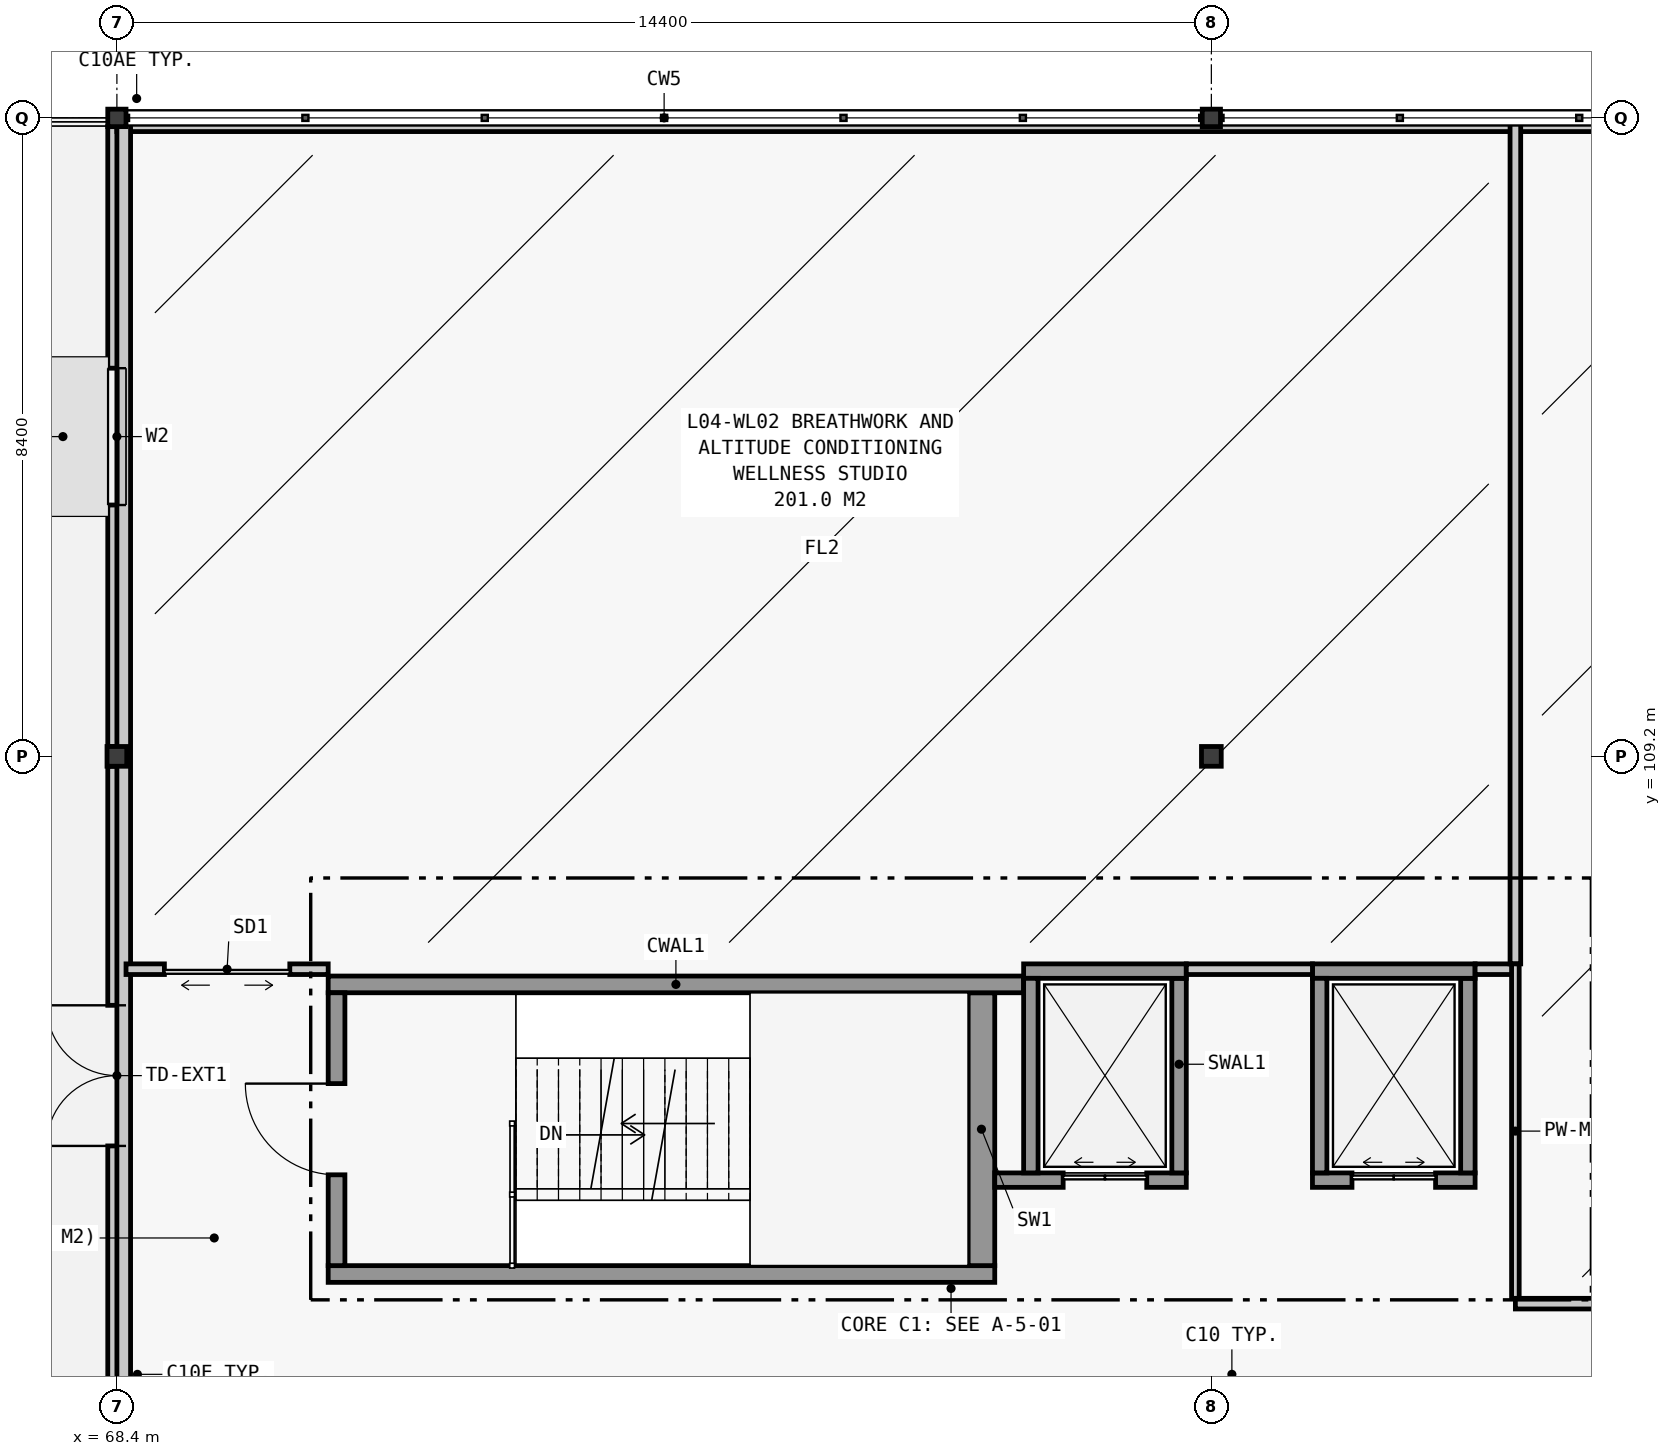
"""IFC4 building model, lengths in metres.
Left out: names, types, materials, properties, quantities, classifications, styles, units other than length and angle.
Written with IfcOpenShell. Run it as: python <this file> out.ifc"""

import sys

from ifc_helpers import new_model, si_unit, direction, frame, frame_2d, origin, origin_2d, place, context, subcontext, project, spatial, rectangle, i_section, extrude, element, fill, save


model = new_model("IFC4")
c1 = context("Model", 3, precision=1e-05, world=origin(), true_north=direction((0.0, 1.0)))
c2 = subcontext(c1, "Body", "Model", "MODEL_VIEW")
j1 = project(units=[si_unit("LENGTHUNIT", "METRE"), si_unit("PLANEANGLEUNIT", "RADIAN")], contexts=[c1])
p1 = place(None, origin())
s1 = spatial("IfcSite", under=j1, at=p1, CompositionType="ELEMENT")
p2 = place(p1, origin())
s2 = spatial("IfcBuilding", under=s1, at=p2, CompositionType="ELEMENT")
p3 = place(p2, frame((0.0, 0.0, 17.4)))
s3 = spatial("IfcBuildingStorey", under=s2, at=p3, CompositionType="ELEMENT", Elevation=17.4)
p4 = place(p3, frame((68.4, 109.2, 0.0), z_axis=(0.0, 0.0, 1.0), x_axis=(1.0, 0.0, 0.0)))
e1 = element("IfcColumn", 1, at=p4, inside=s3, PredefinedType="COLUMN", context=c2, shape_type="SweptSolid", body=[
    extrude(i_section(OverallWidth=0.26, OverallDepth=0.26, WebThickness=0.01, FlangeThickness=0.018, FilletRadius=0.024, at=origin_2d()), origin(), (0.0, 0.0, 1.0), 4.15),
])
p5 = place(p3, frame((68.4, 117.6, 0.0), z_axis=(0.0, 0.0, 1.0), x_axis=(1.0, 0.0, 0.0)))
e2 = element("IfcColumn", 2, at=p5, inside=s3, PredefinedType="COLUMN", context=c2, shape_type="SweptSolid", body=[
    extrude(i_section(OverallWidth=0.24, OverallDepth=0.23, WebThickness=0.008, FlangeThickness=0.012, FilletRadius=0.021, at=origin_2d()), origin(), (0.0, 0.0, 1.0), 4.15),
])
p6 = place(p3, frame((82.8, 109.2, 0.0), z_axis=(0.0, 0.0, 1.0), x_axis=(1.0, 0.0, 0.0)))
e3 = element("IfcColumn", 3, at=p6, inside=s3, PredefinedType="COLUMN", context=c2, shape_type="SweptSolid", body=[
    extrude(i_section(OverallWidth=0.26, OverallDepth=0.26, WebThickness=0.01, FlangeThickness=0.018, FilletRadius=0.024, at=origin_2d()), origin(), (0.0, 0.0, 1.0), 4.15),
])
p7 = place(p3, frame((82.8, 117.6, 0.0), z_axis=(0.0, 0.0, 1.0), x_axis=(1.0, 0.0, 0.0)))
e4 = element("IfcColumn", 4, at=p7, inside=s3, PredefinedType="COLUMN", context=c2, shape_type="SweptSolid", body=[
    extrude(i_section(OverallWidth=0.24, OverallDepth=0.23, WebThickness=0.008, FlangeThickness=0.012, FilletRadius=0.021, at=origin_2d()), origin(), (0.0, 0.0, 1.0), 4.15),
])
p8 = place(p3, frame((68.4, 109.07, 0.0), z_axis=(0.0, 0.0, 1.0), x_axis=(0.0, -1.0, 0.0)))
e5 = element("IfcWall", 5, at=p8, inside=s3, PredefinedType="STANDARD", context=c2, shape_type="SweptSolid", body=[
    extrude(rectangle(XDim=8.14, YDim=0.24, at=frame_2d((4.07, 0.0))), origin(), (0.0, 0.0, 1.0), 3.437),
])
p9 = place(p8, frame((3.145, 0.0, 0.0)))
e6 = element("IfcOpeningElement", 6, at=p9, cuts=e5, PredefinedType="OPENING", context=c2, shape_type="SweptSolid", body=[
    extrude(rectangle(XDim=1.85, YDim=2.25, at=frame_2d((0.925, 1.125))), frame((0.0, 0.135, 0.0), z_axis=(0.0, -1.0, 0.0), x_axis=(1.0, 0.0, 0.0)), (0.0, 0.0, 1.0), 0.27),
])
p10 = place(p3, frame((68.4, 117.485, 0.0), z_axis=(0.0, 0.0, 1.0), x_axis=(0.0, -1.0, 0.0)))
e7 = element("IfcWall", 7, at=p10, inside=s3, PredefinedType="STANDARD", context=c2, shape_type="SweptSolid", body=[
    extrude(rectangle(XDim=8.155, YDim=0.24, at=frame_2d((4.078, 0.0))), origin(), (0.0, 0.0, 1.0), 3.437),
])
p11 = place(p10, frame((3.178, 0.0, 0.9)))
e8 = element("IfcOpeningElement", 8, at=p11, cuts=e7, PredefinedType="OPENING", context=c2, shape_type="SweptSolid", body=[
    extrude(rectangle(XDim=1.8, YDim=1.8, at=frame_2d((0.9, 0.9))), frame((0.0, 0.135, 0.0), z_axis=(0.0, -1.0, 0.0), x_axis=(1.0, 0.0, 0.0)), (0.0, 0.0, 1.0), 0.27),
])
p12 = place(p3, frame((68.4, 117.51, 4.2), z_axis=(0.0, 0.0, 1.0), x_axis=(1.0, 0.0, 0.0)))
e9 = element("IfcWall", 9, at=p12, inside=s3, PredefinedType="PARAPET", context=c2, shape_type="SweptSolid", body=[
    extrude(rectangle(XDim=57.6, YDim=0.18, at=frame_2d((28.8, 0.0))), origin(), (0.0, 0.0, 1.0), 0.95),
])
p13 = place(p3, frame((68.49, 92.4, 4.2), z_axis=(0.0, 0.0, 1.0), x_axis=(0.0, 1.0, 0.0)))
e10 = element("IfcWall", 10, at=p13, inside=s3, PredefinedType="PARAPET", context=c2, shape_type="SweptSolid", body=[
    extrude(rectangle(XDim=25.2, YDim=0.18, at=frame_2d((12.6, 0.0))), origin(), (0.0, 0.0, 1.0), 0.95),
])
p14 = place(p3, frame((71.18, 102.39, 0.0), z_axis=(0.0, 0.0, 1.0), x_axis=(1.0, 0.0, 0.0)))
e11 = element("IfcWall", 11, at=p14, inside=s3, PredefinedType="SOLIDWALL", context=c2, shape_type="SweptSolid", body=[
    extrude(rectangle(XDim=8.77, YDim=0.22, at=frame_2d((4.385, 0.0))), origin(), (0.0, 0.0, 1.0), 3.98),
])
p15 = place(p3, frame((79.775, 102.5, 0.0), z_axis=(0.0, 0.0, 1.0), x_axis=(0.0, 1.0, 0.0)))
e12 = element("IfcWall", 12, at=p15, inside=s3, PredefinedType="SHEAR", context=c2, shape_type="SweptSolid", body=[
    extrude(rectangle(XDim=3.59, YDim=0.35, at=frame_2d((1.795, 0.0))), origin(), (0.0, 0.0, 1.0), 3.98),
])
p16 = place(p3, frame((80.33, 106.2, 0.0), z_axis=(0.0, 0.0, 1.0), x_axis=(-1.0, 0.0, 0.0)))
e13 = element("IfcWall", 13, at=p16, inside=s3, PredefinedType="SOLIDWALL", context=c2, shape_type="SweptSolid", body=[
    extrude(rectangle(XDim=9.15, YDim=0.22, at=frame_2d((4.575, 0.0))), origin(), (0.0, 0.0, 1.0), 3.98),
])
p17 = place(p3, frame((71.29, 106.09, 0.0), z_axis=(0.0, 0.0, 1.0), x_axis=(0.0, -1.0, 0.0)))
e14 = element("IfcWall", 14, at=p17, inside=s3, PredefinedType="SOLIDWALL", context=c2, shape_type="SweptSolid", body=[
    extrude(rectangle(XDim=3.59, YDim=0.22, at=frame_2d((1.795, 0.0))), origin(), (0.0, 0.0, 1.0), 3.98),
])
p18 = place(p17, frame((1.195, 0.0, 0.0)))
e15 = element("IfcOpeningElement", 15, at=p18, cuts=e14, PredefinedType="OPENING", context=c2, shape_type="SweptSolid", body=[
    extrude(rectangle(XDim=1.2, YDim=2.2, at=frame_2d((0.6, 1.1))), frame((0.0, 0.125, 0.0), z_axis=(0.0, -1.0, 0.0), x_axis=(1.0, 0.0, 0.0)), (0.0, 0.0, 1.0), 0.25),
])
p19 = place(p3, frame((79.95, 103.625, 0.0), z_axis=(0.0, 0.0, 1.0), x_axis=(1.0, 0.0, 0.0)))
e16 = element("IfcWall", 16, at=p19, inside=s3, PredefinedType="SOLIDWALL", context=c2, shape_type="SweptSolid", body=[
    extrude(rectangle(XDim=2.52, YDim=0.19, at=frame_2d((1.26, 0.0))), origin(), (0.0, 0.0, 1.0), 3.98),
])
p20 = place(p19, frame((0.9, 0.0, 0.0)))
e17 = element("IfcOpeningElement", 17, at=p20, cuts=e16, PredefinedType="OPENING", context=c2, shape_type="SweptSolid", body=[
    extrude(rectangle(XDim=1.1, YDim=2.2, at=frame_2d((0.55, 1.1))), frame((0.0, 0.11, 0.0), z_axis=(0.0, -1.0, 0.0), x_axis=(1.0, 0.0, 0.0)), (0.0, 0.0, 1.0), 0.22),
])
p21 = place(p3, frame((82.375, 103.72, 0.0), z_axis=(0.0, 0.0, 1.0), x_axis=(0.0, 1.0, 0.0)))
e18 = element("IfcWall", 18, at=p21, inside=s3, PredefinedType="SOLIDWALL", context=c2, shape_type="SweptSolid", body=[
    extrude(rectangle(XDim=2.56, YDim=0.19, at=frame_2d((1.28, 0.0))), origin(), (0.0, 0.0, 1.0), 3.98),
])
p22 = place(p3, frame((82.47, 106.375, 0.0), z_axis=(0.0, 0.0, 1.0), x_axis=(-1.0, 0.0, 0.0)))
e19 = element("IfcWall", 19, at=p22, inside=s3, PredefinedType="SOLIDWALL", context=c2, shape_type="SweptSolid", body=[
    extrude(rectangle(XDim=2.14, YDim=0.19, at=frame_2d((1.07, 0.0))), origin(), (0.0, 0.0, 1.0), 3.98),
])
p23 = place(p3, frame((80.425, 106.28, 0.0), z_axis=(0.0, 0.0, 1.0), x_axis=(0.0, -1.0, 0.0)))
e20 = element("IfcWall", 20, at=p23, inside=s3, PredefinedType="SOLIDWALL", context=c2, shape_type="SweptSolid", body=[
    extrude(rectangle(XDim=2.56, YDim=0.19, at=frame_2d((1.28, 0.0))), origin(), (0.0, 0.0, 1.0), 3.98),
])
p24 = place(p3, frame((84.13, 103.625, 0.0), z_axis=(0.0, 0.0, 1.0), x_axis=(1.0, 0.0, 0.0)))
e21 = element("IfcWall", 21, at=p24, inside=s3, PredefinedType="SOLIDWALL", context=c2, shape_type="SweptSolid", body=[
    extrude(rectangle(XDim=2.14, YDim=0.19, at=frame_2d((1.07, 0.0))), origin(), (0.0, 0.0, 1.0), 3.98),
])
p25 = place(p24, frame((0.52, 0.0, 0.0)))
e22 = element("IfcOpeningElement", 22, at=p25, cuts=e21, PredefinedType="OPENING", context=c2, shape_type="SweptSolid", body=[
    extrude(rectangle(XDim=1.1, YDim=2.2, at=frame_2d((0.55, 1.1))), frame((0.0, 0.11, 0.0), z_axis=(0.0, -1.0, 0.0), x_axis=(1.0, 0.0, 0.0)), (0.0, 0.0, 1.0), 0.22),
])
p26 = place(p3, frame((86.175, 103.72, 0.0), z_axis=(0.0, 0.0, 1.0), x_axis=(0.0, 1.0, 0.0)))
e23 = element("IfcWall", 23, at=p26, inside=s3, PredefinedType="SOLIDWALL", context=c2, shape_type="SweptSolid", body=[
    extrude(rectangle(XDim=2.56, YDim=0.19, at=frame_2d((1.28, 0.0))), origin(), (0.0, 0.0, 1.0), 3.98),
])
p27 = place(p3, frame((86.27, 106.375, 0.0), z_axis=(0.0, 0.0, 1.0), x_axis=(-1.0, 0.0, 0.0)))
e24 = element("IfcWall", 24, at=p27, inside=s3, PredefinedType="SOLIDWALL", context=c2, shape_type="SweptSolid", body=[
    extrude(rectangle(XDim=2.14, YDim=0.19, at=frame_2d((1.07, 0.0))), origin(), (0.0, 0.0, 1.0), 3.98),
])
p28 = place(p3, frame((84.225, 106.28, 0.0), z_axis=(0.0, 0.0, 1.0), x_axis=(0.0, -1.0, 0.0)))
e25 = element("IfcWall", 25, at=p28, inside=s3, PredefinedType="SOLIDWALL", context=c2, shape_type="SweptSolid", body=[
    extrude(rectangle(XDim=2.56, YDim=0.19, at=frame_2d((1.28, 0.0))), origin(), (0.0, 0.0, 1.0), 3.98),
])
p29 = place(p3, frame((68.52, 106.4, 0.0), z_axis=(0.0, 0.0, 1.0), x_axis=(1.0, 0.0, 0.0)))
e26 = element("IfcWall", 26, at=p29, inside=s3, PredefinedType="PARTITIONING", context=c2, shape_type="SweptSolid", body=[
    extrude(rectangle(XDim=2.66, YDim=0.14, at=frame_2d((1.33, 0.0))), origin(), (0.0, 0.0, 1.0), 3.98),
])
p30 = place(p29, frame((0.505, 0.0, 0.0)))
e27 = element("IfcOpeningElement", 27, at=p30, cuts=e26, PredefinedType="OPENING", context=c2, shape_type="SweptSolid", body=[
    extrude(rectangle(XDim=1.65, YDim=2.25, at=frame_2d((0.825, 1.125))), frame((0.0, 0.085, 0.0), z_axis=(0.0, -1.0, 0.0), x_axis=(1.0, 0.0, 0.0)), (0.0, 0.0, 1.0), 0.17),
])
p31 = place(p3, frame((82.47, 106.4, 0.0), z_axis=(0.0, 0.0, 1.0), x_axis=(1.0, 0.0, 0.0)))
e28 = element("IfcWall", 28, at=p31, inside=s3, PredefinedType="PARTITIONING", context=c2, shape_type="SweptSolid", body=[
    extrude(rectangle(XDim=1.66, YDim=0.14, at=frame_2d((0.83, 0.0))), origin(), (0.0, 0.0, 1.0), 3.98),
])
p32 = place(p3, frame((86.27, 106.4, 0.0), z_axis=(0.0, 0.0, 1.0), x_axis=(1.0, 0.0, 0.0)))
e29 = element("IfcWall", 29, at=p32, inside=s3, PredefinedType="PARTITIONING", context=c2, shape_type="SweptSolid", body=[
    extrude(rectangle(XDim=0.53, YDim=0.14, at=frame_2d((0.265, 0.0))), origin(), (0.0, 0.0, 1.0), 3.98),
])
p33 = place(p3, frame((86.8, 106.47, 0.0), z_axis=(0.0, 0.0, 1.0), x_axis=(0.0, 1.0, 0.0)))
e30 = element("IfcWall", 30, at=p33, inside=s3, PredefinedType="PARTITIONING", context=c2, shape_type="SweptSolid", body=[
    extrude(rectangle(XDim=11.11, YDim=0.14, at=frame_2d((5.555, 0.0))), origin(), (0.0, 0.0, 1.0), 3.98),
])
p34 = place(p3, frame((86.8, 102.0, 0.0), z_axis=(0.0, 0.0, 1.0), x_axis=(1.0, 0.0, 0.0)))
e31 = element("IfcWall", 31, at=p34, inside=s3, PredefinedType="PARTITIONING", context=c2, shape_type="SweptSolid", body=[
    extrude(rectangle(XDim=8.6, YDim=0.14, at=frame_2d((4.3, 0.0))), origin(), (0.0, 0.0, 1.0), 3.98),
])
p35 = place(p34, frame((3.825, 0.0, 0.0)))
e32 = element("IfcOpeningElement", 32, at=p35, cuts=e31, PredefinedType="OPENING", context=c2, shape_type="SweptSolid", body=[
    extrude(rectangle(XDim=0.95, YDim=2.15, at=frame_2d((0.475, 1.075))), frame((0.0, 0.085, 0.0), z_axis=(0.0, -1.0, 0.0), x_axis=(1.0, 0.0, 0.0)), (0.0, 0.0, 1.0), 0.17),
])
p36 = place(p3, frame((86.8, 102.07, 0.0), z_axis=(0.0, 0.0, 1.0), x_axis=(0.0, 1.0, 0.0)))
e33 = element("IfcWall", 33, at=p36, inside=s3, PredefinedType="MOVABLE", context=c2, shape_type="SweptSolid", body=[
    extrude(rectangle(XDim=4.4, YDim=0.1, at=frame_2d((2.2, 0.0))), origin(), (0.0, 0.0, 1.0), 3.98),
])
p37 = place(p9, frame((1.85, 0.0, 0.0), z_axis=(0.0, 0.0, 1.0), x_axis=(-1.0, 0.0, 0.0)))
e34 = element("IfcDoor", 34, at=p37, inside=s3, OperationType="DOUBLE_DOOR_SINGLE_SWING", PredefinedType="DOOR", context=c2, shape_type="SweptSolid", body=[
    extrude(rectangle(XDim=1.85, YDim=2.25, at=frame_2d((0.925, 1.125))), frame((0.0, 0.025, 0.0), z_axis=(0.0, -1.0, 0.0), x_axis=(1.0, 0.0, 0.0)), (0.0, 0.0, 1.0), 0.05),
])
fill(e6, e34)
p38 = place(p11, origin())
e35 = element("IfcWindow", 35, at=p38, inside=s3, PartitioningType="SINGLE_PANEL", PredefinedType="WINDOW", context=c2, shape_type="SweptSolid", body=[
    extrude(rectangle(XDim=1.8, YDim=1.8, at=frame_2d((0.9, 0.9))), frame((0.0, 0.03, 0.0), z_axis=(0.0, -1.0, 0.0), x_axis=(1.0, 0.0, 0.0)), (0.0, 0.0, 1.0), 0.06),
])
fill(e8, e35)
p39 = place(p18, frame((1.2, 0.0, 0.0), z_axis=(0.0, 0.0, 1.0), x_axis=(-1.0, 0.0, 0.0)))
e36 = element("IfcDoor", 36, at=p39, inside=s3, OperationType="SINGLE_SWING_LEFT", PredefinedType="DOOR", context=c2, shape_type="SweptSolid", body=[
    extrude(rectangle(XDim=1.2, YDim=2.2, at=frame_2d((0.6, 1.1))), frame((0.0, 0.025, 0.0), z_axis=(0.0, -1.0, 0.0), x_axis=(1.0, 0.0, 0.0)), (0.0, 0.0, 1.0), 0.05),
])
fill(e15, e36)
p40 = place(p20, origin())
e37 = element("IfcDoor", 37, at=p40, inside=s3, OperationType="DOUBLE_DOOR_SLIDING", PredefinedType="DOOR", context=c2, shape_type="SweptSolid", body=[
    extrude(rectangle(XDim=1.1, YDim=2.2, at=frame_2d((0.55, 1.1))), frame((0.0, 0.025, 0.0), z_axis=(0.0, -1.0, 0.0), x_axis=(1.0, 0.0, 0.0)), (0.0, 0.0, 1.0), 0.05),
])
fill(e17, e37)
p41 = place(p25, origin())
e38 = element("IfcDoor", 38, at=p41, inside=s3, OperationType="DOUBLE_DOOR_SLIDING", PredefinedType="DOOR", context=c2, shape_type="SweptSolid", body=[
    extrude(rectangle(XDim=1.1, YDim=2.2, at=frame_2d((0.55, 1.1))), frame((0.0, 0.025, 0.0), z_axis=(0.0, -1.0, 0.0), x_axis=(1.0, 0.0, 0.0)), (0.0, 0.0, 1.0), 0.05),
])
fill(e22, e38)
p42 = place(p30, frame((1.65, 0.0, 0.0), z_axis=(0.0, 0.0, 1.0), x_axis=(-1.0, 0.0, 0.0)))
e39 = element("IfcDoor", 39, at=p42, inside=s3, OperationType="DOUBLE_DOOR_SLIDING", PredefinedType="DOOR", context=c2, shape_type="SweptSolid", body=[
    extrude(rectangle(XDim=1.65, YDim=2.25, at=frame_2d((0.825, 1.125))), frame((0.0, 0.025, 0.0), z_axis=(0.0, -1.0, 0.0), x_axis=(1.0, 0.0, 0.0)), (0.0, 0.0, 1.0), 0.05),
])
fill(e27, e39)
save(model, sys.argv[1])
